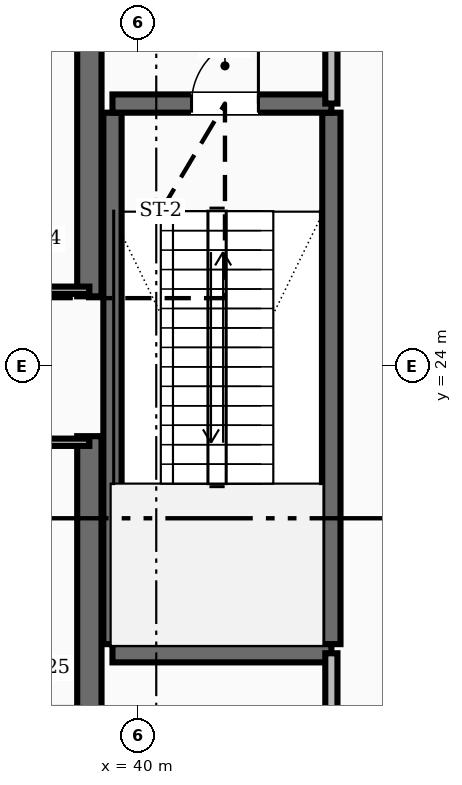
"""IFC4 building model, lengths in metres.
Left out: names, types, materials, properties, quantities, classifications, styles, units other than length and angle.
Written with IfcOpenShell. Run it as: python <this file> out.ifc"""

import sys

from ifc_helpers import new_model, si_unit, direction, frame, frame_2d, origin, place, context, subcontext, project, spatial, rectangle, extrude, element, fill, save


model = new_model("IFC4")
c1 = context("Model", 3, precision=1e-05, world=origin(), true_north=direction((0.0, 1.0)))
c2 = subcontext(c1, "Body", "Model", "MODEL_VIEW")
j1 = project(units=[si_unit("LENGTHUNIT", "METRE"), si_unit("PLANEANGLEUNIT", "RADIAN")], contexts=[c1])
p1 = place(None, origin())
s1 = spatial("IfcSite", under=j1, at=p1, CompositionType="ELEMENT")
p2 = place(p1, origin())
s2 = spatial("IfcBuilding", under=s1, at=p2, CompositionType="ELEMENT")
p3 = place(p2, origin())
s3 = spatial("IfcBuildingStorey", under=s2, at=p3, CompositionType="ELEMENT", Elevation=0.0)
for number, where, z_axis, x_axis in (
    (1, (39.2, 16.55, 0.0), (0.0, 0.0, 1.0), (0.0, 1.0, 0.0)),
    (2, (39.2, 25.15, 0.0), (0.0, 0.0, 1.0), (0.0, 1.0, 0.0)),
):
    element("IfcWall", number, at=place(p3, frame(where, z_axis=z_axis, x_axis=x_axis)), inside=s3, PredefinedType="SHEAR", context=c2, shape_type="SweptSolid", body=[
        extrude(rectangle(XDim=6.3, YDim=0.4, at=frame_2d((3.15, 0.0))), origin(), (0.0, 0.0, 1.0), 5.2),
    ])
for number, where, z_axis, x_axis in (
    (3, (43.18, 19.43, 0.0), (0.0, 0.0, 1.0), (0.0, 1.0, 0.0)),
    (4, (39.58, 19.43, 0.0), (0.0, 0.0, 1.0), (0.0, 1.0, 0.0)),
):
    element("IfcWall", number, at=place(p3, frame(where, z_axis=z_axis, x_axis=x_axis)), inside=s3, PredefinedType="SHEAR", context=c2, shape_type="SweptSolid", body=[
        extrude(rectangle(XDim=8.74, YDim=0.3, at=frame_2d((4.37, 0.0))), origin(), (0.0, 0.0, 1.0), 5.2),
    ])
p4 = place(p3, frame((39.58, 19.28, 0.0), z_axis=(0.0, 0.0, 1.0), x_axis=(1.0, 0.0, 0.0)))
e5 = element("IfcWall", 5, at=p4, inside=s3, PredefinedType="SHEAR", context=c2, shape_type="SweptSolid", body=[
    extrude(rectangle(XDim=3.6, YDim=0.3, at=frame_2d((1.8, 0.0))), origin(), (0.0, 0.0, 1.0), 5.2),
])
p5 = place(p3, frame((39.58, 28.32, 0.0), z_axis=(0.0, 0.0, 1.0), x_axis=(1.0, 0.0, 0.0)))
e6 = element("IfcWall", 6, at=p5, inside=s3, PredefinedType="SHEAR", context=c2, shape_type="SweptSolid", body=[
    extrude(rectangle(XDim=3.6, YDim=0.3, at=frame_2d((1.8, 0.0))), origin(), (0.0, 0.0, 1.0), 5.2),
])
p6 = place(p5, frame((1.3, 0.0, 0.0)))
e7 = element("IfcOpeningElement", 7, at=p6, cuts=e6, PredefinedType="OPENING", context=c2, shape_type="SweptSolid", body=[
    extrude(rectangle(XDim=1.1, YDim=2.1, at=frame_2d((0.55, 1.05))), frame((0.0, 0.16, 0.0), z_axis=(0.0, -1.0, 0.0), x_axis=(1.0, 0.0, 0.0)), (0.0, 0.0, 1.0), 0.32),
])
p7 = place(p3, frame((43.18, 28.32, 0.0), z_axis=(0.0, 0.0, 1.0), x_axis=(0.0, 1.0, 0.0)))
e8 = element("IfcWall", 8, at=p7, inside=s3, PredefinedType="SOLIDWALL", context=c2, shape_type="SweptSolid", body=[
    extrude(rectangle(XDim=3.13, YDim=0.2, at=frame_2d((1.565, 0.0))), origin(), (0.0, 0.0, 1.0), 3.92),
])
p8 = place(p7, frame((1.015, 0.0, 0.0)))
e9 = element("IfcOpeningElement", 9, at=p8, cuts=e8, PredefinedType="OPENING", context=c2, shape_type="SweptSolid", body=[
    extrude(rectangle(XDim=1.1, YDim=2.1, at=frame_2d((0.55, 1.05))), frame((0.0, 0.11, 0.0), z_axis=(0.0, -1.0, 0.0), x_axis=(1.0, 0.0, 0.0)), (0.0, 0.0, 1.0), 0.22),
])
p9 = place(p3, frame((43.18, 16.55, 0.0), z_axis=(0.0, 0.0, 1.0), x_axis=(0.0, 1.0, 0.0)))
e10 = element("IfcWall", 10, at=p9, inside=s3, PredefinedType="SOLIDWALL", context=c2, shape_type="SweptSolid", body=[
    extrude(rectangle(XDim=2.73, YDim=0.2, at=frame_2d((1.365, 0.0))), origin(), (0.0, 0.0, 1.0), 3.92),
])
p10 = place(p9, frame((0.89, 0.0, 0.0)))
e11 = element("IfcOpeningElement", 11, at=p10, cuts=e10, PredefinedType="OPENING", context=c2, shape_type="SweptSolid", body=[
    extrude(rectangle(XDim=0.95, YDim=2.1, at=frame_2d((0.475, 1.05))), frame((0.0, 0.11, 0.0), z_axis=(0.0, -1.0, 0.0), x_axis=(1.0, 0.0, 0.0)), (0.0, 0.0, 1.0), 0.22),
])
for number, where, z_axis, x_axis in (
    (12, (37.4, 25.25, 0.0), (0.0, 0.0, 1.0), (1.0, 0.0, 0.0)),
    (13, (37.4, 22.75, 0.0), (0.0, 0.0, 1.0), (1.0, 0.0, 0.0)),
):
    element("IfcWall", number, at=place(p3, frame(where, z_axis=z_axis, x_axis=x_axis)), inside=s3, PredefinedType="PARTITIONING", context=c2, shape_type="SweptSolid", body=[
        extrude(rectangle(XDim=1.8, YDim=0.12, at=frame_2d((0.9, 0.0))), origin(), (0.0, 0.0, 1.0), 3.92),
    ])
p11 = place(p6, origin())
e14 = element("IfcDoor", 14, at=p11, inside=s3, OperationType="SINGLE_SWING_RIGHT", PredefinedType="DOOR", context=c2, shape_type="SweptSolid", body=[
    extrude(rectangle(XDim=1.1, YDim=2.1, at=frame_2d((0.55, 1.05))), frame((0.0, 0.025, 0.0), z_axis=(0.0, -1.0, 0.0), x_axis=(1.0, 0.0, 0.0)), (0.0, 0.0, 1.0), 0.05),
])
fill(e7, e14)
save(model, sys.argv[1])
